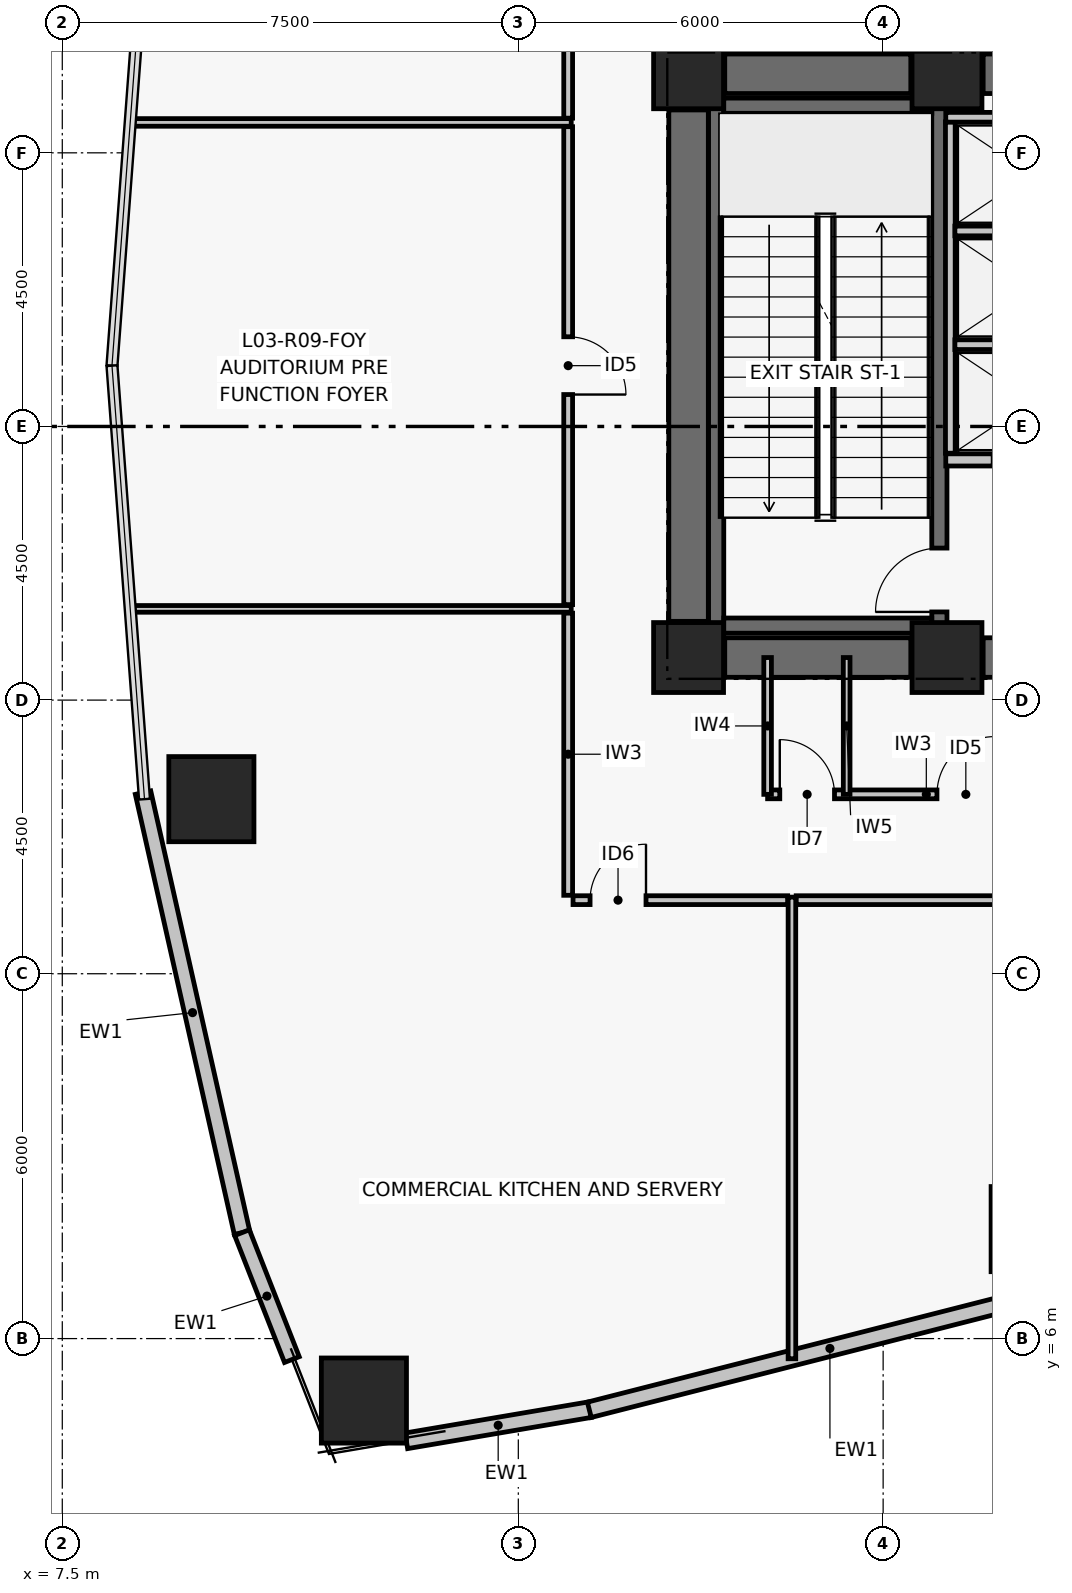
"""IFC4 building model, lengths in metres.
Left out: names, types, materials, properties, quantities, classifications, styles, units other than length and angle.
Written with IfcOpenShell. Run it as: python <this file> out.ifc"""

import sys

from ifc_helpers import new_model, si_unit, direction, frame, frame_2d, origin, origin_2d, place, context, subcontext, project, spatial, rectangle, hollow_rectangle, extrude, element, fill, save


model = new_model("IFC4")
c1 = context("Model", 3, precision=1e-05, world=origin(), true_north=direction((0.0, 1.0)))
c2 = subcontext(c1, "Body", "Model", "MODEL_VIEW")
j1 = project(units=[si_unit("LENGTHUNIT", "METRE"), si_unit("PLANEANGLEUNIT", "RADIAN")], contexts=[c1])
p1 = place(None, origin())
s1 = spatial("IfcSite", under=j1, at=p1, CompositionType="ELEMENT")
p2 = place(p1, origin())
s2 = spatial("IfcBuilding", under=s1, at=p2, CompositionType="ELEMENT")
p3 = place(p2, frame((0.0, 0.0, 18.0)))
s3 = spatial("IfcBuildingStorey", under=s2, at=p3, CompositionType="ELEMENT", Elevation=18.0)
for number, where, z_axis, x_axis in (
    (1, (17.8, 17.2, 0.0), (0.0, 0.0, 1.0), (1.0, 0.0, 0.0)),
    (2, (22.05, 17.2, 0.0), (0.0, 0.0, 1.0), (1.0, 0.0, 0.0)),
    (3, (17.8, 26.8, 0.0), (0.0, 0.0, 1.0), (1.0, 0.0, 0.0)),
    (4, (22.05, 26.8, 0.0), (0.0, 0.0, 1.0), (1.0, 0.0, 0.0)),
):
    element("IfcColumn", number, at=place(p3, frame(where, z_axis=z_axis, x_axis=x_axis)), inside=s3, PredefinedType="COLUMN", context=c2, shape_type="SweptSolid", body=[
        extrude(rectangle(XDim=1.15, YDim=1.15, at=origin_2d()), origin(), (0.0, 0.0, 1.0), 4.8),
    ])
p4 = place(p3, frame((18.395, 17.2, 0.0), z_axis=(0.0, 0.0, 1.0), x_axis=(1.0, 0.0, 0.0)))
e5 = element("IfcWall", 5, at=p4, inside=s3, PredefinedType="SHEAR", context=c2, shape_type="SweptSolid", body=[
    extrude(rectangle(XDim=3.06, YDim=0.65, at=frame_2d((1.53, 0.0))), origin(), (0.0, 0.0, 1.0), 4.48),
])
p5 = place(p3, frame((22.645, 17.2, 0.0), z_axis=(0.0, 0.0, 1.0), x_axis=(1.0, 0.0, 0.0)))
e6 = element("IfcWall", 6, at=p5, inside=s3, PredefinedType="SHEAR", context=c2, shape_type="SweptSolid", body=[
    extrude(rectangle(XDim=1.705, YDim=0.65, at=frame_2d((0.853, 0.0))), origin(), (0.0, 0.0, 1.0), 4.48),
])
p6 = place(p3, frame((18.395, 26.8, 0.0), z_axis=(0.0, 0.0, 1.0), x_axis=(1.0, 0.0, 0.0)))
e7 = element("IfcWall", 7, at=p6, inside=s3, PredefinedType="SHEAR", context=c2, shape_type="SweptSolid", body=[
    extrude(rectangle(XDim=3.06, YDim=0.65, at=frame_2d((1.53, 0.0))), origin(), (0.0, 0.0, 1.0), 4.48),
])
p7 = place(p3, frame((22.645, 26.8, 0.0), z_axis=(0.0, 0.0, 1.0), x_axis=(1.0, 0.0, 0.0)))
e8 = element("IfcWall", 8, at=p7, inside=s3, PredefinedType="SHEAR", context=c2, shape_type="SweptSolid", body=[
    extrude(rectangle(XDim=1.705, YDim=0.65, at=frame_2d((0.853, 0.0))), origin(), (0.0, 0.0, 1.0), 4.48),
])
p8 = place(p3, frame((17.8, 17.795, 0.0), z_axis=(0.0, 0.0, 1.0), x_axis=(0.0, 1.0, 0.0)))
e9 = element("IfcWall", 9, at=p8, inside=s3, PredefinedType="SHEAR", context=c2, shape_type="SweptSolid", body=[
    extrude(rectangle(XDim=8.41, YDim=0.65, at=frame_2d((4.205, 0.0))), origin(), (0.0, 0.0, 1.0), 4.48),
])
p9 = place(p3, frame((18.254, 17.6, 0.0), z_axis=(0.0, 0.0, 1.0), x_axis=(0.0, 1.0, 0.0)))
e10 = element("IfcWall", 10, at=p9, inside=s3, PredefinedType="SHEAR", context=c2, shape_type="SweptSolid", body=[
    extrude(rectangle(XDim=8.8, YDim=0.25, at=frame_2d((4.4, 0.0))), origin(), (0.0, 0.0, 1.0), 4.48),
])
p10 = place(p3, frame((21.925, 17.6, 0.0), z_axis=(0.0, 0.0, 1.0), x_axis=(0.0, 1.0, 0.0)))
e11 = element("IfcWall", 11, at=p10, inside=s3, PredefinedType="SHEAR", context=c2, shape_type="SweptSolid", body=[
    extrude(rectangle(XDim=8.8, YDim=0.25, at=frame_2d((4.4, 0.0))), origin(), (0.0, 0.0, 1.0), 4.48),
])
p11 = place(p10, frame((0.35, 0.0, 0.0)))
e12 = element("IfcOpeningElement", 12, at=p11, cuts=e11, PredefinedType="OPENING", context=c2, shape_type="SweptSolid", body=[
    extrude(rectangle(XDim=1.05, YDim=2.08, at=frame_2d((0.525, 1.04))), frame((0.0, 0.135, 0.0), z_axis=(0.0, -1.0, 0.0), x_axis=(1.0, 0.0, 0.0)), (0.0, 0.0, 1.0), 0.27),
])
for number, where, z_axis, x_axis in (
    (13, (18.379, 17.725, 0.0), (0.0, 0.0, 1.0), (1.0, 0.0, 0.0)),
    (14, (18.379, 26.275, 0.0), (0.0, 0.0, 1.0), (1.0, 0.0, 0.0)),
):
    element("IfcWall", number, at=place(p3, frame(where, z_axis=z_axis, x_axis=x_axis)), inside=s3, PredefinedType="SHEAR", context=c2, shape_type="SweptSolid", body=[
        extrude(rectangle(XDim=3.421, YDim=0.25, at=frame_2d((1.71, 0.0))), origin(), (0.0, 0.0, 1.0), 4.48),
    ])
for number, where, z_axis, x_axis in (
    (15, (9.952, 14.871, 0.0), (0.0, 0.0, 1.0), (1.0, 0.0, 0.0)),
    (16, (12.46, 4.981, 0.0), (0.0, 0.0, 1.0), (1.0, 0.0, 0.0)),
    (17, (23.476, 7.8, 0.0), (0.0, 0.0, 1.0), (1.0, 0.0, 0.0)),
):
    element("IfcColumn", number, at=place(p3, frame(where, z_axis=z_axis, x_axis=x_axis)), inside=s3, PredefinedType="COLUMN", context=c2, shape_type="SweptSolid", body=[
        extrude(hollow_rectangle(XDim=1.4, YDim=1.4, WallThickness=0.055, at=origin_2d()), origin(), (0.0, 0.0, 1.0), 4.8),
    ])
p12 = place(p3, frame((10.456, 7.742, 0.0), z_axis=(0.0, 0.0, 1.0), x_axis=(-0.219512195122, 0.975609756098, 0.0)))
e18 = element("IfcWall", 18, at=p12, inside=s3, PredefinedType="PARTITIONING", context=c2, shape_type="SweptSolid", body=[
    extrude(rectangle(XDim=7.417, YDim=0.26, at=frame_2d((3.708, 0.0))), origin(), (0.0, 0.0, 1.0), 4.48),
])
p13 = place(p3, frame((11.276, 5.655, 0.0), z_axis=(0.0, 0.0, 1.0), x_axis=(-0.365527759733, 0.930800438797, 0.0)))
e19 = element("IfcWall", 19, at=p13, inside=s3, PredefinedType="PARTITIONING", context=c2, shape_type="SweptSolid", body=[
    extrude(rectangle(XDim=2.243, YDim=0.26, at=frame_2d((1.122, 0.0))), origin(), (0.0, 0.0, 1.0), 4.48),
])
p14 = place(p3, frame((16.179, 4.831, 0.0), z_axis=(0.0, 0.0, 1.0), x_axis=(-0.985905166387, -0.167305119144, 0.0)))
e20 = element("IfcWall", 20, at=p14, inside=s3, PredefinedType="PARTITIONING", context=c2, shape_type="SweptSolid", body=[
    extrude(rectangle(XDim=3.064, YDim=0.26, at=frame_2d((1.532, 0.0))), origin(), (0.0, 0.0, 1.0), 4.48),
])
p15 = place(p3, frame((24.081, 6.847, 0.0), z_axis=(0.0, 0.0, 1.0), x_axis=(-0.968981557045, -0.247133045354, 0.0)))
e21 = element("IfcWall", 21, at=p15, inside=s3, PredefinedType="PARTITIONING", context=c2, shape_type="SweptSolid", body=[
    extrude(rectangle(XDim=8.167, YDim=0.26, at=frame_2d((4.083, 0.0))), origin(), (0.0, 0.0, 1.0), 4.48),
])
p16 = place(p3, frame((22.03, 20.45, 0.0), z_axis=(0.0, 0.0, 1.0), x_axis=(1.0, 0.0, 0.0)))
e22 = element("IfcWall", 22, at=p16, inside=s3, PredefinedType="PARTITIONING", context=c2, shape_type="SweptSolid", body=[
    extrude(rectangle(XDim=2.8, YDim=0.2, at=frame_2d((1.4, 0.0))), origin(), (0.0, 0.0, 1.0), 4.48),
])
p17 = place(p16, frame((0.78, 0.0, 0.0)))
e23 = element("IfcOpeningElement", 23, at=p17, cuts=e22, PredefinedType="OPENING", context=c2, shape_type="SweptSolid", body=[
    extrude(rectangle(XDim=1.1, YDim=2.08, at=frame_2d((0.55, 1.04))), frame((0.0, 0.11, 0.0), z_axis=(0.0, -1.0, 0.0), x_axis=(1.0, 0.0, 0.0)), (0.0, 0.0, 1.0), 0.22),
])
p18 = place(p3, frame((22.105, 20.56, 0.0), z_axis=(0.0, 0.0, 1.0), x_axis=(0.0, 1.0, 0.0)))
e24 = element("IfcWall", 24, at=p18, inside=s3, PredefinedType="PARTITIONING", context=c2, shape_type="SweptSolid", body=[
    extrude(rectangle(XDim=5.45, YDim=0.16, at=frame_2d((2.725, 0.0))), origin(), (0.0, 0.0, 1.0), 4.48),
])
p19 = place(p3, frame((22.18, 22.345, 0.0), z_axis=(0.0, 0.0, 1.0), x_axis=(1.0, 0.0, 0.0)))
e25 = element("IfcWall", 25, at=p19, inside=s3, PredefinedType="PARTITIONING", context=c2, shape_type="SweptSolid", body=[
    extrude(rectangle(XDim=2.65, YDim=0.16, at=frame_2d((1.325, 0.0))), origin(), (0.0, 0.0, 1.0), 4.48),
])
p20 = place(p3, frame((22.18, 24.215, 0.0), z_axis=(0.0, 0.0, 1.0), x_axis=(1.0, 0.0, 0.0)))
e26 = element("IfcWall", 26, at=p20, inside=s3, PredefinedType="PARTITIONING", context=c2, shape_type="SweptSolid", body=[
    extrude(rectangle(XDim=2.49, YDim=0.16, at=frame_2d((1.245, 0.0))), origin(), (0.0, 0.0, 1.0), 4.48),
])
p21 = place(p3, frame((22.03, 26.085, 0.0), z_axis=(0.0, 0.0, 1.0), x_axis=(1.0, 0.0, 0.0)))
e27 = element("IfcWall", 27, at=p21, inside=s3, PredefinedType="PARTITIONING", context=c2, shape_type="SweptSolid", body=[
    extrude(rectangle(XDim=2.83, YDim=0.16, at=frame_2d((1.415, 0.0))), origin(), (0.0, 0.0, 1.0), 4.48),
])
p22 = place(p3, frame((19.1, 14.95, 0.0), z_axis=(0.0, 0.0, 1.0), x_axis=(1.0, 0.0, 0.0)))
e28 = element("IfcWall", 28, at=p22, inside=s3, PredefinedType="PARTITIONING", context=c2, shape_type="SweptSolid", body=[
    extrude(rectangle(XDim=5.22, YDim=0.145, at=frame_2d((2.61, 0.0))), origin(), (0.0, 0.0, 1.0), 3.56),
])
p23 = place(p22, frame((0.2, 0.0, 0.0)))
e29 = element("IfcOpeningElement", 29, at=p23, cuts=e28, PredefinedType="OPENING", context=c2, shape_type="SweptSolid", body=[
    extrude(rectangle(XDim=0.9, YDim=2.02, at=frame_2d((0.45, 1.01))), frame((0.0, 0.083, 0.0), z_axis=(0.0, -1.0, 0.0), x_axis=(1.0, 0.0, 0.0)), (0.0, 0.0, 1.0), 0.165),
])
p24 = place(p22, frame((2.785, 0.0, 0.0)))
e30 = element("IfcOpeningElement", 30, at=p24, cuts=e28, PredefinedType="OPENING", context=c2, shape_type="SweptSolid", body=[
    extrude(rectangle(XDim=0.95, YDim=2.06, at=frame_2d((0.475, 1.03))), frame((0.0, 0.083, 0.0), z_axis=(0.0, -1.0, 0.0), x_axis=(1.0, 0.0, 0.0)), (0.0, 0.0, 1.0), 0.165),
])
p25 = place(p3, frame((19.1, 14.95, 0.0), z_axis=(0.0, 0.0, 1.0), x_axis=(0.0, 1.0, 0.0)))
e31 = element("IfcWall", 31, at=p25, inside=s3, PredefinedType="PARTITIONING", context=c2, shape_type="SweptSolid", body=[
    extrude(rectangle(XDim=2.25, YDim=0.125, at=frame_2d((1.125, 0.0))), origin(), (0.0, 0.0, 1.0), 3.61),
])
p26 = place(p3, frame((20.4, 14.95, 0.0), z_axis=(0.0, 0.0, 1.0), x_axis=(0.0, 1.0, 0.0)))
e32 = element("IfcWall", 32, at=p26, inside=s3, PredefinedType="PARTITIONING", context=c2, shape_type="SweptSolid", body=[
    extrude(rectangle(XDim=2.25, YDim=0.11, at=frame_2d((1.125, 0.0))), origin(), (0.0, 0.0, 1.0), 3.61),
])
p27 = place(p3, frame((15.82, 17.93, 0.0), z_axis=(0.0, 0.0, 1.0), x_axis=(0.0, -1.0, 0.0)))
e33 = element("IfcWall", 33, at=p27, inside=s3, PredefinedType="PARTITIONING", context=c2, shape_type="SweptSolid", body=[
    extrude(rectangle(XDim=4.64, YDim=0.145, at=frame_2d((2.32, 0.0))), origin(), (0.0, 0.0, 1.0), 3.56),
])
p28 = place(p3, frame((15.9, 13.21, 0.0), z_axis=(0.0, 0.0, 1.0), x_axis=(1.0, 0.0, 0.0)))
e34 = element("IfcWall", 34, at=p28, inside=s3, PredefinedType="PARTITIONING", context=c2, shape_type="SweptSolid", body=[
    extrude(rectangle(XDim=3.53, YDim=0.145, at=frame_2d((1.765, 0.0))), origin(), (0.0, 0.0, 1.0), 3.56),
])
p29 = place(p28, frame((0.28, 0.0, 0.0)))
e35 = element("IfcOpeningElement", 35, at=p29, cuts=e34, PredefinedType="OPENING", context=c2, shape_type="SweptSolid", body=[
    extrude(rectangle(XDim=0.92, YDim=2.05, at=frame_2d((0.46, 1.025))), frame((0.0, 0.083, 0.0), z_axis=(0.0, -1.0, 0.0), x_axis=(1.0, 0.0, 0.0)), (0.0, 0.0, 1.0), 0.165),
])
p30 = place(p3, frame((19.57, 13.21, 0.0), z_axis=(0.0, 0.0, 1.0), x_axis=(1.0, 0.0, 0.0)))
e36 = element("IfcWall", 36, at=p30, inside=s3, PredefinedType="PARTITIONING", context=c2, shape_type="SweptSolid", body=[
    extrude(rectangle(XDim=11.36, YDim=0.145, at=frame_2d((5.68, 0.0))), origin(), (0.0, 0.0, 1.0), 3.56),
])
p31 = place(p30, frame((5.205, 0.0, 0.0)))
e37 = element("IfcOpeningElement", 37, at=p31, cuts=e36, PredefinedType="OPENING", context=c2, shape_type="SweptSolid", body=[
    extrude(rectangle(XDim=0.95, YDim=2.06, at=frame_2d((0.475, 1.03))), frame((0.0, 0.083, 0.0), z_axis=(0.0, -1.0, 0.0), x_axis=(1.0, 0.0, 0.0)), (0.0, 0.0, 1.0), 0.165),
])
p32 = place(p3, frame((15.82, 28.7, 0.0), z_axis=(0.0, 0.0, 1.0), x_axis=(0.0, -1.0, 0.0)))
e38 = element("IfcWall", 38, at=p32, inside=s3, PredefinedType="PARTITIONING", context=c2, shape_type="SweptSolid", body=[
    extrude(rectangle(XDim=2.63, YDim=0.145, at=frame_2d((1.315, 0.0))), origin(), (0.0, 0.0, 1.0), 3.56),
])
p33 = place(p3, frame((15.82, 25.93, 0.0), z_axis=(0.0, 0.0, 1.0), x_axis=(0.0, -1.0, 0.0)))
e39 = element("IfcWall", 39, at=p33, inside=s3, PredefinedType="PARTITIONING", context=c2, shape_type="SweptSolid", body=[
    extrude(rectangle(XDim=7.86, YDim=0.145, at=frame_2d((3.93, 0.0))), origin(), (0.0, 0.0, 1.0), 4.48),
])
p34 = place(p33, frame((3.455, 0.0, 0.0)))
e40 = element("IfcOpeningElement", 40, at=p34, cuts=e39, PredefinedType="OPENING", context=c2, shape_type="SweptSolid", body=[
    extrude(rectangle(XDim=0.95, YDim=2.06, at=frame_2d((0.475, 1.03))), frame((0.0, 0.083, 0.0), z_axis=(0.0, -1.0, 0.0), x_axis=(1.0, 0.0, 0.0)), (0.0, 0.0, 1.0), 0.165),
])
p35 = place(p3, frame((19.5, 5.668, 0.0), z_axis=(0.0, 0.0, 1.0), x_axis=(0.0, 1.0, 0.0)))
e41 = element("IfcWall", 41, at=p35, inside=s3, PredefinedType="PARTITIONING", context=c2, shape_type="SweptSolid", body=[
    extrude(rectangle(XDim=7.592, YDim=0.125, at=frame_2d((3.796, 0.0))), origin(), (0.0, 0.0, 1.0), 3.86),
])
p36 = place(p3, frame((8.607, 18.0, 0.0), z_axis=(0.0, 0.0, 1.0), x_axis=(1.0, 0.0, 0.0)))
e42 = element("IfcWall", 42, at=p36, inside=s3, PredefinedType="PARTITIONING", context=c2, shape_type="SweptSolid", body=[
    extrude(rectangle(XDim=7.263, YDim=0.11, at=frame_2d((3.631, 0.0))), origin(), (0.0, 0.0, 1.0), 3.86),
])
p37 = place(p3, frame((8.607, 26.0, 0.0), z_axis=(0.0, 0.0, 1.0), x_axis=(1.0, 0.0, 0.0)))
e43 = element("IfcWall", 43, at=p37, inside=s3, PredefinedType="PARTITIONING", context=c2, shape_type="SweptSolid", body=[
    extrude(rectangle(XDim=7.263, YDim=0.125, at=frame_2d((3.631, 0.0))), origin(), (0.0, 0.0, 1.0), 3.86),
])
p38 = place(p11, origin())
e44 = element("IfcDoor", 44, at=p38, inside=s3, OperationType="SINGLE_SWING_LEFT", PredefinedType="DOOR", context=c2, shape_type="SweptSolid", body=[
    extrude(rectangle(XDim=1.05, YDim=2.08, at=frame_2d((0.525, 1.04))), frame((0.0, 0.025, 0.0), z_axis=(0.0, -1.0, 0.0), x_axis=(1.0, 0.0, 0.0)), (0.0, 0.0, 1.0), 0.05),
])
fill(e12, e44)
p39 = place(p23, origin())
e45 = element("IfcDoor", 45, at=p39, inside=s3, OperationType="SINGLE_SWING_LEFT", PredefinedType="DOOR", context=c2, shape_type="SweptSolid", body=[
    extrude(rectangle(XDim=0.9, YDim=2.02, at=frame_2d((0.45, 1.01))), frame((0.0, 0.025, 0.0), z_axis=(0.0, -1.0, 0.0), x_axis=(1.0, 0.0, 0.0)), (0.0, 0.0, 1.0), 0.05),
])
fill(e29, e45)
p40 = place(p24, origin())
e46 = element("IfcDoor", 46, at=p40, inside=s3, OperationType="SINGLE_SWING_RIGHT", PredefinedType="DOOR", context=c2, shape_type="SweptSolid", body=[
    extrude(rectangle(XDim=0.95, YDim=2.06, at=frame_2d((0.475, 1.03))), frame((0.0, 0.025, 0.0), z_axis=(0.0, -1.0, 0.0), x_axis=(1.0, 0.0, 0.0)), (0.0, 0.0, 1.0), 0.05),
])
fill(e30, e46)
p41 = place(p29, origin())
e47 = element("IfcDoor", 47, at=p41, inside=s3, OperationType="SINGLE_SWING_RIGHT", PredefinedType="DOOR", context=c2, shape_type="SweptSolid", body=[
    extrude(rectangle(XDim=0.92, YDim=2.05, at=frame_2d((0.46, 1.025))), frame((0.0, 0.025, 0.0), z_axis=(0.0, -1.0, 0.0), x_axis=(1.0, 0.0, 0.0)), (0.0, 0.0, 1.0), 0.05),
])
fill(e35, e47)
p42 = place(p34, origin())
e48 = element("IfcDoor", 48, at=p42, inside=s3, OperationType="SINGLE_SWING_RIGHT", PredefinedType="DOOR", context=c2, shape_type="SweptSolid", body=[
    extrude(rectangle(XDim=0.95, YDim=2.06, at=frame_2d((0.475, 1.03))), frame((0.0, 0.025, 0.0), z_axis=(0.0, -1.0, 0.0), x_axis=(1.0, 0.0, 0.0)), (0.0, 0.0, 1.0), 0.05),
])
fill(e40, e48)
save(model, sys.argv[1])
